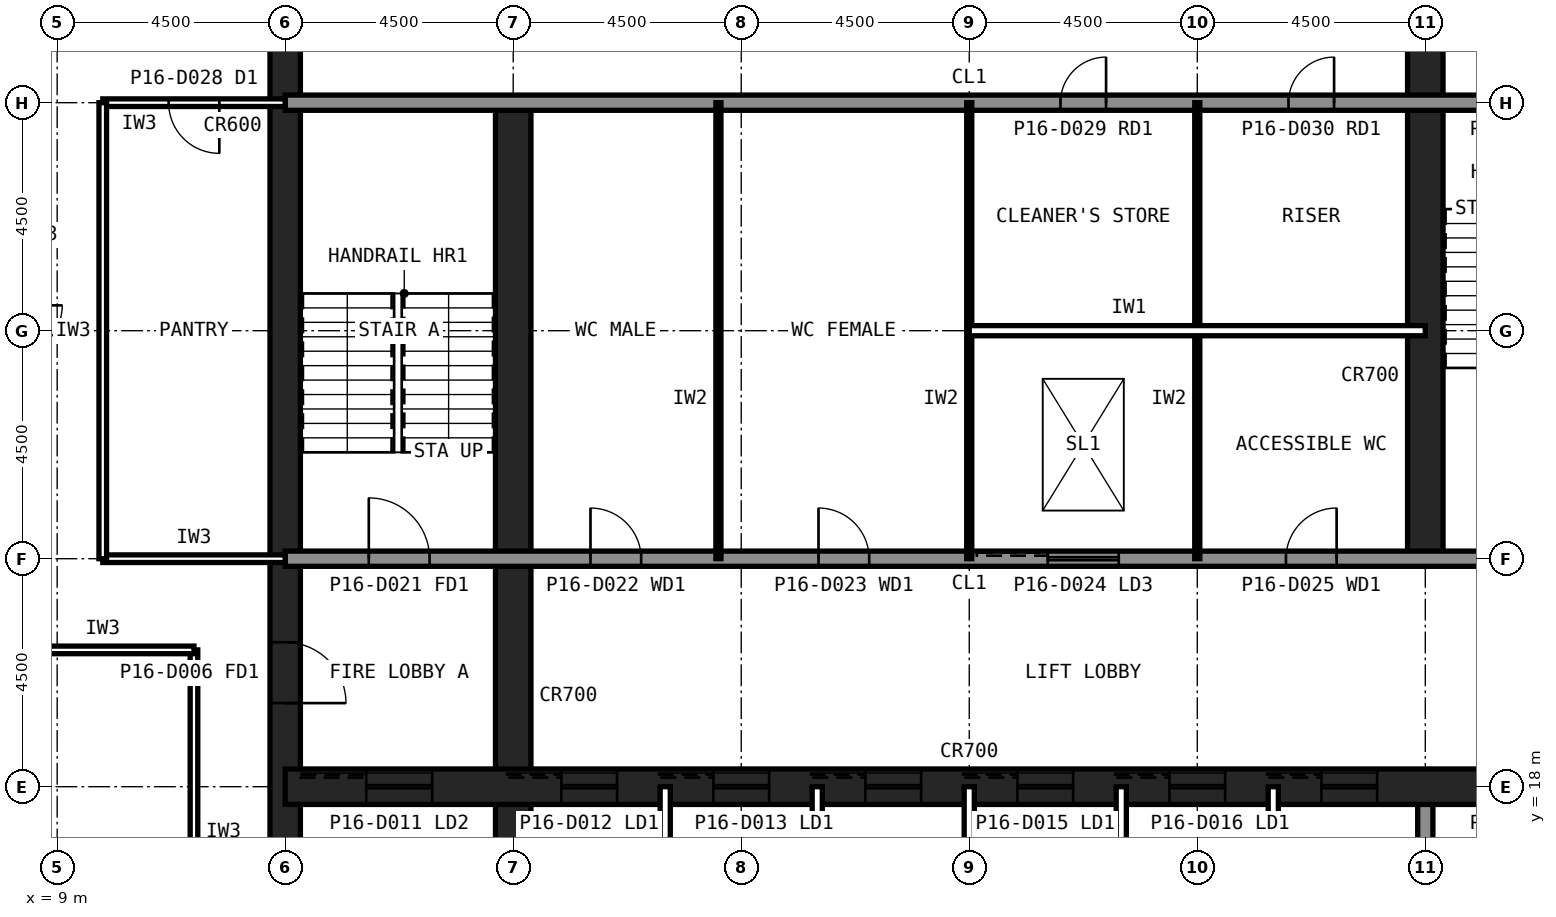
"""IFC4 building model, lengths in metres.
Left out: names, types, materials, properties, quantities, classifications, styles, units other than length and angle.
Written with IfcOpenShell. Run it as: python <this file> out.ifc"""

import sys

from ifc_helpers import new_model, si_unit, direction, frame, frame_2d, origin, place, context, subcontext, project, spatial, rectangle, extrude, element, fill, save


model = new_model("IFC4")
c1 = context("Model", 3, precision=1e-05, world=origin(), true_north=direction((0.0, 1.0)))
c2 = subcontext(c1, "Body", "Model", "MODEL_VIEW")
j1 = project(units=[si_unit("LENGTHUNIT", "METRE"), si_unit("PLANEANGLEUNIT", "RADIAN")], contexts=[c1])
p1 = place(None, origin())
s1 = spatial("IfcSite", under=j1, at=p1, CompositionType="ELEMENT")
p2 = place(p1, origin())
s2 = spatial("IfcBuilding", under=s1, at=p2, CompositionType="ELEMENT")
p3 = place(p2, frame((0.0, 0.0, 71.0)))
s3 = spatial("IfcBuildingStorey", under=s2, at=p3, CompositionType="ELEMENT", Elevation=71.0)
p4 = place(p3, frame((13.5, 40.5, 0.0), z_axis=(0.0, 0.0, 1.0), x_axis=(0.0, -1.0, 0.0)))
e1 = element("IfcWall", 1, at=p4, inside=s3, PredefinedType="SHEAR", context=c2, shape_type="SweptSolid", body=[
    extrude(rectangle(XDim=27.0, YDim=0.6, at=frame_2d((13.5, 0.0))), origin(), (0.0, 0.0, 1.0), 4.2),
])
p5 = place(p4, frame((19.65, 0.0, 0.0)))
e2 = element("IfcOpeningElement", 2, at=p5, cuts=e1, PredefinedType="OPENING", context=c2, shape_type="SweptSolid", body=[
    extrude(rectangle(XDim=1.2, YDim=2.1, at=frame_2d((0.6, 1.05))), frame((0.0, 0.31, 0.0), z_axis=(0.0, -1.0, 0.0), x_axis=(1.0, 0.0, 0.0)), (0.0, 0.0, 1.0), 0.62),
])
p6 = place(p4, frame((5.85, 0.0, 0.0)))
e3 = element("IfcOpeningElement", 3, at=p6, cuts=e1, PredefinedType="OPENING", context=c2, shape_type="SweptSolid", body=[
    extrude(rectangle(XDim=1.8, YDim=2.1, at=frame_2d((0.9, 1.05))), frame((0.0, 0.31, 0.0), z_axis=(0.0, -1.0, 0.0), x_axis=(1.0, 0.0, 0.0)), (0.0, 0.0, 1.0), 0.62),
])
p7 = place(p3, frame((18.0, 13.5, 0.0), z_axis=(0.0, 0.0, 1.0), x_axis=(0.0, 1.0, 0.0)))
e4 = element("IfcWall", 4, at=p7, inside=s3, PredefinedType="SHEAR", context=c2, shape_type="SweptSolid", body=[
    extrude(rectangle(XDim=18.0, YDim=0.7, at=frame_2d((9.0, 0.0))), origin(), (0.0, 0.0, 1.0), 4.2),
])
p8 = place(p3, frame((36.0, 13.5, 0.0), z_axis=(0.0, 0.0, 1.0), x_axis=(0.0, 1.0, 0.0)))
e5 = element("IfcWall", 5, at=p8, inside=s3, PredefinedType="SOLIDWALL", context=c2, shape_type="SweptSolid", body=[
    extrude(rectangle(XDim=4.5, YDim=0.3, at=frame_2d((2.25, 0.0))), origin(), (0.0, 0.0, 1.0), 4.04),
])
p9 = place(p3, frame((36.0, 22.5, 0.0), z_axis=(0.0, 0.0, 1.0), x_axis=(0.0, 1.0, 0.0)))
e6 = element("IfcWall", 6, at=p9, inside=s3, PredefinedType="SHEAR", context=c2, shape_type="SweptSolid", body=[
    extrude(rectangle(XDim=18.0, YDim=0.7, at=frame_2d((9.0, 0.0))), origin(), (0.0, 0.0, 1.0), 4.2),
])
p10 = place(p3, frame((13.5, 18.0, 0.0), z_axis=(0.0, 0.0, 1.0), x_axis=(1.0, 0.0, 0.0)))
e7 = element("IfcWall", 7, at=p10, inside=s3, PredefinedType="SHEAR", context=c2, shape_type="SweptSolid", body=[
    extrude(rectangle(XDim=27.0, YDim=0.7, at=frame_2d((13.5, 0.0))), origin(), (0.0, 0.0, 1.0), 4.2),
])
p11 = place(p10, frame((24.3, 0.0, 0.0)))
e8 = element("IfcOpeningElement", 8, at=p11, cuts=e7, PredefinedType="OPENING", context=c2, shape_type="SweptSolid", body=[
    extrude(rectangle(XDim=0.9, YDim=2.1, at=frame_2d((0.45, 1.05))), frame((0.0, 0.36, 0.0), z_axis=(0.0, -1.0, 0.0), x_axis=(1.0, 0.0, 0.0)), (0.0, 0.0, 1.0), 0.72),
])
p12 = place(p10, frame((5.45, 0.0, 0.0)))
e9 = element("IfcOpeningElement", 9, at=p12, cuts=e7, PredefinedType="OPENING", context=c2, shape_type="SweptSolid", body=[
    extrude(rectangle(XDim=1.1, YDim=2.1, at=frame_2d((0.55, 1.05))), frame((0.0, 0.36, 0.0), z_axis=(0.0, -1.0, 0.0), x_axis=(1.0, 0.0, 0.0)), (0.0, 0.0, 1.0), 0.72),
])
p13 = place(p10, frame((8.45, 0.0, 0.0)))
e10 = element("IfcOpeningElement", 10, at=p13, cuts=e7, PredefinedType="OPENING", context=c2, shape_type="SweptSolid", body=[
    extrude(rectangle(XDim=1.1, YDim=2.1, at=frame_2d((0.55, 1.05))), frame((0.0, 0.36, 0.0), z_axis=(0.0, -1.0, 0.0), x_axis=(1.0, 0.0, 0.0)), (0.0, 0.0, 1.0), 0.72),
])
p14 = place(p10, frame((11.45, 0.0, 0.0)))
e11 = element("IfcOpeningElement", 11, at=p14, cuts=e7, PredefinedType="OPENING", context=c2, shape_type="SweptSolid", body=[
    extrude(rectangle(XDim=1.1, YDim=2.1, at=frame_2d((0.55, 1.05))), frame((0.0, 0.36, 0.0), z_axis=(0.0, -1.0, 0.0), x_axis=(1.0, 0.0, 0.0)), (0.0, 0.0, 1.0), 0.72),
])
p15 = place(p10, frame((14.45, 0.0, 0.0)))
e12 = element("IfcOpeningElement", 12, at=p15, cuts=e7, PredefinedType="OPENING", context=c2, shape_type="SweptSolid", body=[
    extrude(rectangle(XDim=1.1, YDim=2.1, at=frame_2d((0.55, 1.05))), frame((0.0, 0.36, 0.0), z_axis=(0.0, -1.0, 0.0), x_axis=(1.0, 0.0, 0.0)), (0.0, 0.0, 1.0), 0.72),
])
p16 = place(p10, frame((17.45, 0.0, 0.0)))
e13 = element("IfcOpeningElement", 13, at=p16, cuts=e7, PredefinedType="OPENING", context=c2, shape_type="SweptSolid", body=[
    extrude(rectangle(XDim=1.1, YDim=2.1, at=frame_2d((0.55, 1.05))), frame((0.0, 0.36, 0.0), z_axis=(0.0, -1.0, 0.0), x_axis=(1.0, 0.0, 0.0)), (0.0, 0.0, 1.0), 0.72),
])
p17 = place(p10, frame((20.45, 0.0, 0.0)))
e14 = element("IfcOpeningElement", 14, at=p17, cuts=e7, PredefinedType="OPENING", context=c2, shape_type="SweptSolid", body=[
    extrude(rectangle(XDim=1.1, YDim=2.1, at=frame_2d((0.55, 1.05))), frame((0.0, 0.36, 0.0), z_axis=(0.0, -1.0, 0.0), x_axis=(1.0, 0.0, 0.0)), (0.0, 0.0, 1.0), 0.72),
])
p18 = place(p10, frame((1.6, 0.0, 0.0)))
e15 = element("IfcOpeningElement", 15, at=p18, cuts=e7, PredefinedType="OPENING", context=c2, shape_type="SweptSolid", body=[
    extrude(rectangle(XDim=1.3, YDim=2.2, at=frame_2d((0.65, 1.1))), frame((0.0, 0.36, 0.0), z_axis=(0.0, -1.0, 0.0), x_axis=(1.0, 0.0, 0.0)), (0.0, 0.0, 1.0), 0.72),
])
p19 = place(p3, frame((13.5, 22.5, 0.0), z_axis=(0.0, 0.0, 1.0), x_axis=(1.0, 0.0, 0.0)))
e16 = element("IfcWall", 16, at=p19, inside=s3, PredefinedType="SOLIDWALL", context=c2, shape_type="SweptSolid", body=[
    extrude(rectangle(XDim=27.0, YDim=0.3, at=frame_2d((13.5, 0.0))), origin(), (0.0, 0.0, 1.0), 4.04),
])
p20 = place(p19, frame((1.65, 0.0, 0.0)))
e17 = element("IfcOpeningElement", 17, at=p20, cuts=e16, PredefinedType="OPENING", context=c2, shape_type="SweptSolid", body=[
    extrude(rectangle(XDim=1.2, YDim=2.1, at=frame_2d((0.6, 1.05))), frame((0.0, 0.16, 0.0), z_axis=(0.0, -1.0, 0.0), x_axis=(1.0, 0.0, 0.0)), (0.0, 0.0, 1.0), 0.32),
])
p21 = place(p19, frame((6.025, 0.0, 0.0)))
e18 = element("IfcOpeningElement", 18, at=p21, cuts=e16, PredefinedType="OPENING", context=c2, shape_type="SweptSolid", body=[
    extrude(rectangle(XDim=1.0, YDim=2.1, at=frame_2d((0.5, 1.05))), frame((0.0, 0.16, 0.0), z_axis=(0.0, -1.0, 0.0), x_axis=(1.0, 0.0, 0.0)), (0.0, 0.0, 1.0), 0.32),
])
p22 = place(p19, frame((10.525, 0.0, 0.0)))
e19 = element("IfcOpeningElement", 19, at=p22, cuts=e16, PredefinedType="OPENING", context=c2, shape_type="SweptSolid", body=[
    extrude(rectangle(XDim=1.0, YDim=2.1, at=frame_2d((0.5, 1.05))), frame((0.0, 0.16, 0.0), z_axis=(0.0, -1.0, 0.0), x_axis=(1.0, 0.0, 0.0)), (0.0, 0.0, 1.0), 0.32),
])
p23 = place(p19, frame((19.75, 0.0, 0.0)))
e20 = element("IfcOpeningElement", 20, at=p23, cuts=e16, PredefinedType="OPENING", context=c2, shape_type="SweptSolid", body=[
    extrude(rectangle(XDim=1.0, YDim=2.1, at=frame_2d((0.5, 1.05))), frame((0.0, 0.16, 0.0), z_axis=(0.0, -1.0, 0.0), x_axis=(1.0, 0.0, 0.0)), (0.0, 0.0, 1.0), 0.32),
])
p24 = place(p19, frame((15.05, 0.0, 0.0)))
e21 = element("IfcOpeningElement", 21, at=p24, cuts=e16, PredefinedType="OPENING", context=c2, shape_type="SweptSolid", body=[
    extrude(rectangle(XDim=1.4, YDim=2.4, at=frame_2d((0.7, 1.2))), frame((0.0, 0.16, 0.0), z_axis=(0.0, -1.0, 0.0), x_axis=(1.0, 0.0, 0.0)), (0.0, 0.0, 1.0), 0.32),
])
p25 = place(p3, frame((13.5, 31.5, 0.0), z_axis=(0.0, 0.0, 1.0), x_axis=(1.0, 0.0, 0.0)))
e22 = element("IfcWall", 22, at=p25, inside=s3, PredefinedType="SOLIDWALL", context=c2, shape_type="SweptSolid", body=[
    extrude(rectangle(XDim=27.0, YDim=0.3, at=frame_2d((13.5, 0.0))), origin(), (0.0, 0.0, 1.0), 4.04),
])
p26 = place(p25, frame((24.15, 0.0, 0.0)))
e23 = element("IfcOpeningElement", 23, at=p26, cuts=e22, PredefinedType="OPENING", context=c2, shape_type="SweptSolid", body=[
    extrude(rectangle(XDim=1.2, YDim=2.1, at=frame_2d((0.6, 1.05))), frame((0.0, 0.16, 0.0), z_axis=(0.0, -1.0, 0.0), x_axis=(1.0, 0.0, 0.0)), (0.0, 0.0, 1.0), 0.32),
])
p27 = place(p25, frame((15.3, 0.0, 0.0)))
e24 = element("IfcOpeningElement", 24, at=p27, cuts=e22, PredefinedType="OPENING", context=c2, shape_type="SweptSolid", body=[
    extrude(rectangle(XDim=0.9, YDim=2.1, at=frame_2d((0.45, 1.05))), frame((0.0, 0.16, 0.0), z_axis=(0.0, -1.0, 0.0), x_axis=(1.0, 0.0, 0.0)), (0.0, 0.0, 1.0), 0.32),
])
p28 = place(p25, frame((19.8, 0.0, 0.0)))
e25 = element("IfcOpeningElement", 25, at=p28, cuts=e22, PredefinedType="OPENING", context=c2, shape_type="SweptSolid", body=[
    extrude(rectangle(XDim=0.9, YDim=2.1, at=frame_2d((0.45, 1.05))), frame((0.0, 0.16, 0.0), z_axis=(0.0, -1.0, 0.0), x_axis=(1.0, 0.0, 0.0)), (0.0, 0.0, 1.0), 0.32),
])
for number, where, z_axis, x_axis in (
    (26, (21.0, 13.5, 0.0), (0.0, 0.0, 1.0), (0.0, 1.0, 0.0)),
    (27, (24.0, 13.5, 0.0), (0.0, 0.0, 1.0), (0.0, 1.0, 0.0)),
    (28, (27.0, 13.5, 0.0), (0.0, 0.0, 1.0), (0.0, 1.0, 0.0)),
    (29, (30.0, 13.5, 0.0), (0.0, 0.0, 1.0), (0.0, 1.0, 0.0)),
    (30, (33.0, 13.5, 0.0), (0.0, 0.0, 1.0), (0.0, 1.0, 0.0)),
):
    element("IfcWall", number, at=place(p3, frame(where, z_axis=z_axis, x_axis=x_axis)), inside=s3, PredefinedType="PARTITIONING", context=c2, shape_type="SweptSolid", body=[
        extrude(rectangle(XDim=4.5, YDim=0.2, at=frame_2d((2.25, 0.0))), origin(), (0.0, 0.0, 1.0), 4.04),
    ])
for number, where, z_axis, x_axis in (
    (31, (22.05, 22.5, 0.0), (0.0, 0.0, 1.0), (0.0, 1.0, 0.0)),
    (32, (27.0, 22.5, 0.0), (0.0, 0.0, 1.0), (0.0, 1.0, 0.0)),
    (33, (31.5, 22.5, 0.0), (0.0, 0.0, 1.0), (0.0, 1.0, 0.0)),
):
    element("IfcWall", number, at=place(p3, frame(where, z_axis=z_axis, x_axis=x_axis)), inside=s3, PredefinedType="PLUMBINGWALL", context=c2, shape_type="SweptSolid", body=[
        extrude(rectangle(XDim=9.0, YDim=0.1, at=frame_2d((4.5, 0.0))), origin(), (0.0, 0.0, 1.0), 4.04),
    ])
p29 = place(p3, frame((27.0, 27.0, 0.0), z_axis=(0.0, 0.0, 1.0), x_axis=(1.0, 0.0, 0.0)))
e34 = element("IfcWall", 34, at=p29, inside=s3, PredefinedType="PARTITIONING", context=c2, shape_type="SweptSolid", body=[
    extrude(rectangle(XDim=9.0, YDim=0.2, at=frame_2d((4.5, 0.0))), origin(), (0.0, 0.0, 1.0), 4.04),
])
p30 = place(p3, frame((11.7, 20.7, 0.0), z_axis=(0.0, 0.0, 1.0), x_axis=(0.0, -1.0, 0.0)))
e35 = element("IfcWall", 35, at=p30, inside=s3, PredefinedType="PARTITIONING", context=c2, shape_type="SweptSolid", body=[
    extrude(rectangle(XDim=7.2, YDim=0.15, at=frame_2d((3.6, 0.0))), origin(), (0.0, 0.0, 1.0), 4.04),
])
p31 = place(p3, frame((8.1, 20.7, 0.0), z_axis=(0.0, 0.0, 1.0), x_axis=(1.0, 0.0, 0.0)))
e36 = element("IfcWall", 36, at=p31, inside=s3, PredefinedType="PARTITIONING", context=c2, shape_type="SweptSolid", body=[
    extrude(rectangle(XDim=3.6, YDim=0.15, at=frame_2d((1.8, 0.0))), origin(), (0.0, 0.0, 1.0), 4.04),
])
p32 = place(p3, frame((9.9, 22.5, 0.0), z_axis=(0.0, 0.0, 1.0), x_axis=(1.0, 0.0, 0.0)))
e37 = element("IfcWall", 37, at=p32, inside=s3, PredefinedType="PARTITIONING", context=c2, shape_type="SweptSolid", body=[
    extrude(rectangle(XDim=3.6, YDim=0.15, at=frame_2d((1.8, 0.0))), origin(), (0.0, 0.0, 1.0), 3.189),
])
p33 = place(p3, frame((13.5, 31.5, 0.0), z_axis=(0.0, 0.0, 1.0), x_axis=(-1.0, 0.0, 0.0)))
e38 = element("IfcWall", 38, at=p33, inside=s3, PredefinedType="PARTITIONING", context=c2, shape_type="SweptSolid", body=[
    extrude(rectangle(XDim=3.6, YDim=0.15, at=frame_2d((1.8, 0.0))), origin(), (0.0, 0.0, 1.0), 3.189),
])
p34 = place(p33, frame((1.3, 0.0, 0.0)))
e39 = element("IfcOpeningElement", 39, at=p34, cuts=e38, PredefinedType="OPENING", context=c2, shape_type="SweptSolid", body=[
    extrude(rectangle(XDim=1.0, YDim=2.1, at=frame_2d((0.5, 1.05))), frame((0.0, 0.085, 0.0), z_axis=(0.0, -1.0, 0.0), x_axis=(1.0, 0.0, 0.0)), (0.0, 0.0, 1.0), 0.17),
])
p35 = place(p3, frame((9.9, 31.5, 0.0), z_axis=(0.0, 0.0, 1.0), x_axis=(0.0, -1.0, 0.0)))
e40 = element("IfcWall", 40, at=p35, inside=s3, PredefinedType="PARTITIONING", context=c2, shape_type="SweptSolid", body=[
    extrude(rectangle(XDim=9.0, YDim=0.15, at=frame_2d((4.5, 0.0))), origin(), (0.0, 0.0, 1.0), 4.04),
])
p36 = place(p5, origin())
e41 = element("IfcDoor", 41, at=p36, inside=s3, OperationType="SINGLE_SWING_RIGHT", PredefinedType="DOOR", context=c2, shape_type="SweptSolid", body=[
    extrude(rectangle(XDim=1.2, YDim=2.1, at=frame_2d((0.6, 1.05))), frame((0.0, 0.025, 0.0), z_axis=(0.0, -1.0, 0.0), x_axis=(1.0, 0.0, 0.0)), (0.0, 0.0, 1.0), 0.05),
])
fill(e2, e41)
p37 = place(p20, origin())
e42 = element("IfcDoor", 42, at=p37, inside=s3, OperationType="SINGLE_SWING_LEFT", PredefinedType="DOOR", context=c2, shape_type="SweptSolid", body=[
    extrude(rectangle(XDim=1.2, YDim=2.1, at=frame_2d((0.6, 1.05))), frame((0.0, 0.025, 0.0), z_axis=(0.0, -1.0, 0.0), x_axis=(1.0, 0.0, 0.0)), (0.0, 0.0, 1.0), 0.05),
])
fill(e17, e42)
p38 = place(p21, origin())
e43 = element("IfcDoor", 43, at=p38, inside=s3, OperationType="SINGLE_SWING_LEFT", PredefinedType="DOOR", context=c2, shape_type="SweptSolid", body=[
    extrude(rectangle(XDim=1.0, YDim=2.1, at=frame_2d((0.5, 1.05))), frame((0.0, 0.025, 0.0), z_axis=(0.0, -1.0, 0.0), x_axis=(1.0, 0.0, 0.0)), (0.0, 0.0, 1.0), 0.05),
])
fill(e18, e43)
p39 = place(p22, origin())
e44 = element("IfcDoor", 44, at=p39, inside=s3, OperationType="SINGLE_SWING_LEFT", PredefinedType="DOOR", context=c2, shape_type="SweptSolid", body=[
    extrude(rectangle(XDim=1.0, YDim=2.1, at=frame_2d((0.5, 1.05))), frame((0.0, 0.025, 0.0), z_axis=(0.0, -1.0, 0.0), x_axis=(1.0, 0.0, 0.0)), (0.0, 0.0, 1.0), 0.05),
])
fill(e19, e44)
p40 = place(p23, origin())
e45 = element("IfcDoor", 45, at=p40, inside=s3, OperationType="SINGLE_SWING_RIGHT", PredefinedType="DOOR", context=c2, shape_type="SweptSolid", body=[
    extrude(rectangle(XDim=1.0, YDim=2.1, at=frame_2d((0.5, 1.05))), frame((0.0, 0.025, 0.0), z_axis=(0.0, -1.0, 0.0), x_axis=(1.0, 0.0, 0.0)), (0.0, 0.0, 1.0), 0.05),
])
fill(e20, e45)
p41 = place(p27, origin())
e46 = element("IfcDoor", 46, at=p41, inside=s3, OperationType="SINGLE_SWING_RIGHT", PredefinedType="DOOR", context=c2, shape_type="SweptSolid", body=[
    extrude(rectangle(XDim=0.9, YDim=2.1, at=frame_2d((0.45, 1.05))), frame((0.0, 0.025, 0.0), z_axis=(0.0, -1.0, 0.0), x_axis=(1.0, 0.0, 0.0)), (0.0, 0.0, 1.0), 0.05),
])
fill(e24, e46)
p42 = place(p28, origin())
e47 = element("IfcDoor", 47, at=p42, inside=s3, OperationType="SINGLE_SWING_RIGHT", PredefinedType="DOOR", context=c2, shape_type="SweptSolid", body=[
    extrude(rectangle(XDim=0.9, YDim=2.1, at=frame_2d((0.45, 1.05))), frame((0.0, 0.025, 0.0), z_axis=(0.0, -1.0, 0.0), x_axis=(1.0, 0.0, 0.0)), (0.0, 0.0, 1.0), 0.05),
])
fill(e25, e47)
p43 = place(p12, origin())
e48 = element("IfcDoor", 48, at=p43, inside=s3, OperationType="SLIDING_TO_LEFT", PredefinedType="DOOR", context=c2, shape_type="SweptSolid", body=[
    extrude(rectangle(XDim=1.1, YDim=2.1, at=frame_2d((0.55, 1.05))), frame((0.0, 0.025, 0.0), z_axis=(0.0, -1.0, 0.0), x_axis=(1.0, 0.0, 0.0)), (0.0, 0.0, 1.0), 0.05),
])
fill(e9, e48)
p44 = place(p13, origin())
e49 = element("IfcDoor", 49, at=p44, inside=s3, OperationType="SLIDING_TO_LEFT", PredefinedType="DOOR", context=c2, shape_type="SweptSolid", body=[
    extrude(rectangle(XDim=1.1, YDim=2.1, at=frame_2d((0.55, 1.05))), frame((0.0, 0.025, 0.0), z_axis=(0.0, -1.0, 0.0), x_axis=(1.0, 0.0, 0.0)), (0.0, 0.0, 1.0), 0.05),
])
fill(e10, e49)
p45 = place(p14, origin())
e50 = element("IfcDoor", 50, at=p45, inside=s3, OperationType="SLIDING_TO_LEFT", PredefinedType="DOOR", context=c2, shape_type="SweptSolid", body=[
    extrude(rectangle(XDim=1.1, YDim=2.1, at=frame_2d((0.55, 1.05))), frame((0.0, 0.025, 0.0), z_axis=(0.0, -1.0, 0.0), x_axis=(1.0, 0.0, 0.0)), (0.0, 0.0, 1.0), 0.05),
])
fill(e11, e50)
p46 = place(p15, origin())
e51 = element("IfcDoor", 51, at=p46, inside=s3, OperationType="SLIDING_TO_LEFT", PredefinedType="DOOR", context=c2, shape_type="SweptSolid", body=[
    extrude(rectangle(XDim=1.1, YDim=2.1, at=frame_2d((0.55, 1.05))), frame((0.0, 0.025, 0.0), z_axis=(0.0, -1.0, 0.0), x_axis=(1.0, 0.0, 0.0)), (0.0, 0.0, 1.0), 0.05),
])
fill(e12, e51)
p47 = place(p16, origin())
e52 = element("IfcDoor", 52, at=p47, inside=s3, OperationType="SLIDING_TO_LEFT", PredefinedType="DOOR", context=c2, shape_type="SweptSolid", body=[
    extrude(rectangle(XDim=1.1, YDim=2.1, at=frame_2d((0.55, 1.05))), frame((0.0, 0.025, 0.0), z_axis=(0.0, -1.0, 0.0), x_axis=(1.0, 0.0, 0.0)), (0.0, 0.0, 1.0), 0.05),
])
fill(e13, e52)
p48 = place(p17, origin())
e53 = element("IfcDoor", 53, at=p48, inside=s3, OperationType="SLIDING_TO_LEFT", PredefinedType="DOOR", context=c2, shape_type="SweptSolid", body=[
    extrude(rectangle(XDim=1.1, YDim=2.1, at=frame_2d((0.55, 1.05))), frame((0.0, 0.025, 0.0), z_axis=(0.0, -1.0, 0.0), x_axis=(1.0, 0.0, 0.0)), (0.0, 0.0, 1.0), 0.05),
])
fill(e14, e53)
p49 = place(p18, origin())
e54 = element("IfcDoor", 54, at=p49, inside=s3, OperationType="SLIDING_TO_LEFT", PredefinedType="DOOR", context=c2, shape_type="SweptSolid", body=[
    extrude(rectangle(XDim=1.3, YDim=2.2, at=frame_2d((0.65, 1.1))), frame((0.0, 0.025, 0.0), z_axis=(0.0, -1.0, 0.0), x_axis=(1.0, 0.0, 0.0)), (0.0, 0.0, 1.0), 0.05),
])
fill(e15, e54)
p50 = place(p24, origin())
e55 = element("IfcDoor", 55, at=p50, inside=s3, OperationType="SLIDING_TO_LEFT", PredefinedType="DOOR", context=c2, shape_type="SweptSolid", body=[
    extrude(rectangle(XDim=1.4, YDim=2.4, at=frame_2d((0.7, 1.2))), frame((0.0, 0.025, 0.0), z_axis=(0.0, -1.0, 0.0), x_axis=(1.0, 0.0, 0.0)), (0.0, 0.0, 1.0), 0.05),
])
fill(e21, e55)
p51 = place(p34, origin())
e56 = element("IfcDoor", 56, at=p51, inside=s3, OperationType="SINGLE_SWING_LEFT", PredefinedType="DOOR", context=c2, shape_type="SweptSolid", body=[
    extrude(rectangle(XDim=1.0, YDim=2.1, at=frame_2d((0.5, 1.05))), frame((0.0, 0.025, 0.0), z_axis=(0.0, -1.0, 0.0), x_axis=(1.0, 0.0, 0.0)), (0.0, 0.0, 1.0), 0.05),
])
fill(e39, e56)
save(model, sys.argv[1])
